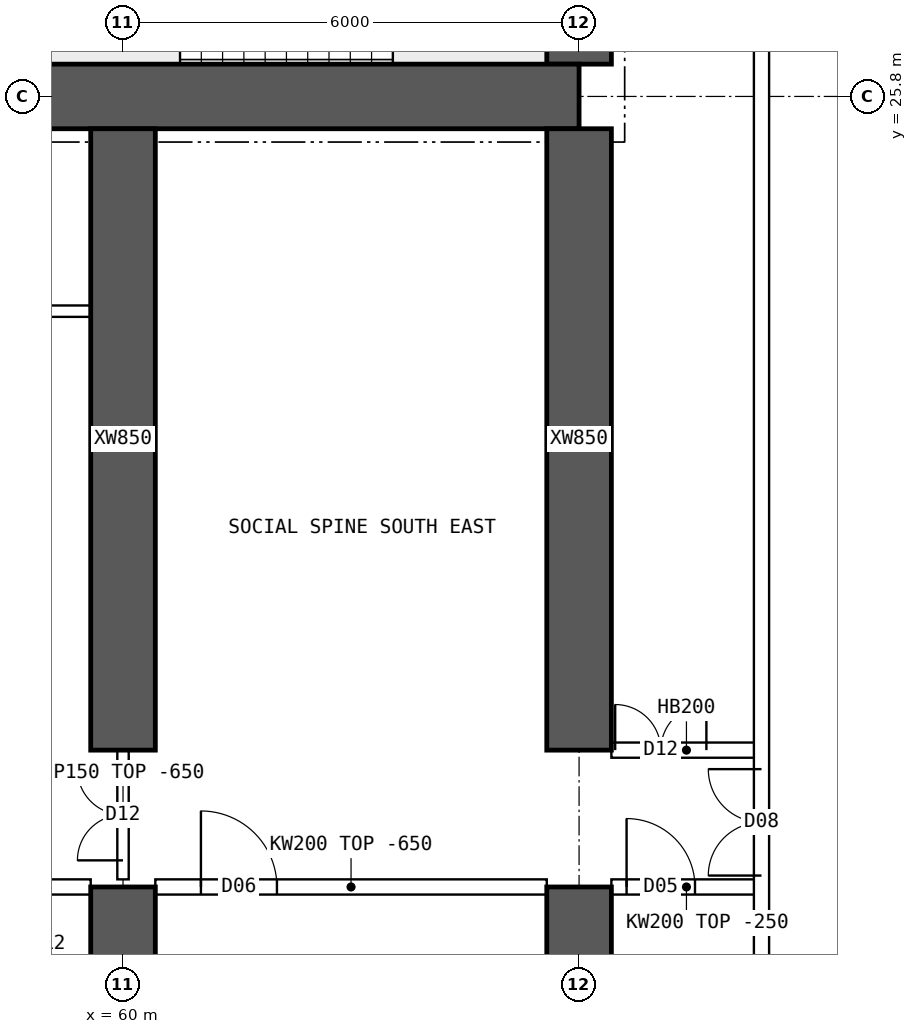
"""IFC4 building model, lengths in metres.
Left out: names, types, materials, properties, quantities, classifications, styles, units other than length and angle.
Written with IfcOpenShell. Run it as: python <this file> out.ifc"""

import sys

from ifc_helpers import new_model, si_unit, direction, frame, frame_2d, origin, place, context, subcontext, project, spatial, polyline, rectangle, outline, extrude, element, fill, save


model = new_model("IFC4")
c1 = context("Model", 3, precision=1e-05, world=origin(), true_north=direction((0.0, 1.0)))
c2 = subcontext(c1, "Body", "Model", "MODEL_VIEW")
j1 = project(units=[si_unit("LENGTHUNIT", "METRE"), si_unit("PLANEANGLEUNIT", "RADIAN")], contexts=[c1])
p1 = place(None, origin())
s1 = spatial("IfcSite", under=j1, at=p1, CompositionType="ELEMENT")
p2 = place(p1, origin())
s2 = spatial("IfcBuilding", under=s1, at=p2, CompositionType="ELEMENT")
p3 = place(p2, frame((0.0, 0.0, 152.35)))
s3 = spatial("IfcBuildingStorey", under=s2, at=p3, CompositionType="ELEMENT", Elevation=152.35)
p4 = place(p3, frame((18.0, 25.8, 0.0), z_axis=(0.0, 0.0, 1.0), x_axis=(1.0, 0.0, 0.0)))
e1 = element("IfcWall", 1, at=p4, inside=s3, PredefinedType="SHEAR", context=c2, shape_type="SweptSolid", body=[
    extrude(rectangle(XDim=48.0, YDim=0.85, at=frame_2d((24.0, 0.0))), origin(), (0.0, 0.0, 1.0), 3.75),
])
p5 = place(p3, frame((66.0, 26.225, 0.0), z_axis=(0.0, 0.0, 1.0), x_axis=(0.0, 1.0, 0.0)))
e2 = element("IfcWall", 2, at=p5, inside=s3, PredefinedType="SHEAR", context=c2, shape_type="SweptSolid", body=[
    extrude(rectangle(XDim=11.55, YDim=0.85, at=frame_2d((5.775, 0.0))), origin(), (0.0, 0.0, 1.0), 3.75),
])
p6 = place(p5, frame((5.075, 0.0, 0.0)))
e3 = element("IfcOpeningElement", 3, at=p6, cuts=e2, PredefinedType="OPENING", context=c2, shape_type="SweptSolid", body=[
    extrude(rectangle(XDim=1.2, YDim=2.1, at=frame_2d((0.6, 1.05))), frame((0.0, 0.435, 0.0), z_axis=(0.0, -1.0, 0.0), x_axis=(1.0, 0.0, 0.0)), (0.0, 0.0, 1.0), 0.87),
])
p7 = place(p3, frame((60.0, 10.0, 0.0), z_axis=(0.0, 0.0, 1.0), x_axis=(0.0, 1.0, 0.0)))
e4 = element("IfcWall", 4, at=p7, inside=s3, PredefinedType="SHEAR", context=c2, shape_type="SweptSolid", body=[
    extrude(rectangle(XDim=5.4, YDim=0.85, at=frame_2d((2.7, 0.0))), origin(), (0.0, 0.0, 1.0), 3.75),
])
p8 = place(p3, frame((60.0, 17.2, 0.0), z_axis=(0.0, 0.0, 1.0), x_axis=(0.0, 1.0, 0.0)))
e5 = element("IfcWall", 5, at=p8, inside=s3, PredefinedType="SHEAR", context=c2, shape_type="SweptSolid", body=[
    extrude(rectangle(XDim=8.175, YDim=0.85, at=frame_2d((4.087, 0.0))), origin(), (0.0, 0.0, 1.0), 3.75),
])
p9 = place(p3, frame((66.0, 10.0, 0.0), z_axis=(0.0, 0.0, 1.0), x_axis=(0.0, 1.0, 0.0)))
e6 = element("IfcWall", 6, at=p9, inside=s3, PredefinedType="SHEAR", context=c2, shape_type="SweptSolid", body=[
    extrude(rectangle(XDim=5.4, YDim=0.85, at=frame_2d((2.7, 0.0))), origin(), (0.0, 0.0, 1.0), 3.75),
])
p10 = place(p3, frame((66.0, 17.2, 0.0), z_axis=(0.0, 0.0, 1.0), x_axis=(0.0, 1.0, 0.0)))
e7 = element("IfcWall", 7, at=p10, inside=s3, PredefinedType="SHEAR", context=c2, shape_type="SweptSolid", body=[
    extrude(rectangle(XDim=8.175, YDim=0.85, at=frame_2d((4.087, 0.0))), origin(), (0.0, 0.0, 1.0), 3.75),
])
p11 = place(p3, frame((54.425, 15.4, 0.0), z_axis=(0.0, 0.0, 1.0), x_axis=(1.0, 0.0, 0.0)))
e8 = element("IfcWall", 8, at=p11, inside=s3, PredefinedType="SOLIDWALL", context=c2, shape_type="SweptSolid", body=[
    extrude(outline(polyline([(0.0, 0.0), (5.15, 0.0), (5.15, 3.1), (0.0, 3.1), (0.0, 0.0)])), frame((0.0, 0.1, 0.0), z_axis=(0.0, -1.0, 0.0), x_axis=(1.0, 0.0, 0.0)), (0.0, 0.0, 1.0), 0.2),
])
p12 = place(p11, frame((0.1, 0.0, 0.0)))
e9 = element("IfcOpeningElement", 9, at=p12, cuts=e8, PredefinedType="OPENING", context=c2, shape_type="SweptSolid", body=[
    extrude(rectangle(XDim=0.9, YDim=2.1, at=frame_2d((0.45, 1.05))), frame((0.0, 0.11, 0.0), z_axis=(0.0, -1.0, 0.0), x_axis=(1.0, 0.0, 0.0)), (0.0, 0.0, 1.0), 0.22),
])
p13 = place(p3, frame((60.425, 15.4, 0.0), z_axis=(0.0, 0.0, 1.0), x_axis=(1.0, 0.0, 0.0)))
e10 = element("IfcWall", 10, at=p13, inside=s3, PredefinedType="SOLIDWALL", context=c2, shape_type="SweptSolid", body=[
    extrude(outline(polyline([(0.0, 0.0), (5.15, 0.0), (5.15, 3.1), (0.0, 3.1), (0.0, 0.0)])), frame((0.0, 0.1, 0.0), z_axis=(0.0, -1.0, 0.0), x_axis=(1.0, 0.0, 0.0)), (0.0, 0.0, 1.0), 0.2),
])
p14 = place(p13, frame((0.6, 0.0, 0.0)))
e11 = element("IfcOpeningElement", 11, at=p14, cuts=e10, PredefinedType="OPENING", context=c2, shape_type="SweptSolid", body=[
    extrude(rectangle(XDim=1.0, YDim=2.1, at=frame_2d((0.5, 1.05))), frame((0.0, 0.11, 0.0), z_axis=(0.0, -1.0, 0.0), x_axis=(1.0, 0.0, 0.0)), (0.0, 0.0, 1.0), 0.22),
])
p15 = place(p3, frame((66.425, 15.4, 0.0), z_axis=(0.0, 0.0, 1.0), x_axis=(1.0, 0.0, 0.0)))
e12 = element("IfcWall", 12, at=p15, inside=s3, PredefinedType="SOLIDWALL", context=c2, shape_type="SweptSolid", body=[
    extrude(rectangle(XDim=1.975, YDim=0.2, at=frame_2d((0.987, 0.0))), origin(), (0.0, 0.0, 1.0), 3.5),
])
p16 = place(p15, frame((0.2, 0.0, 0.0)))
e13 = element("IfcOpeningElement", 13, at=p16, cuts=e12, PredefinedType="OPENING", context=c2, shape_type="SweptSolid", body=[
    extrude(rectangle(XDim=0.9, YDim=2.1, at=frame_2d((0.45, 1.05))), frame((0.0, 0.11, 0.0), z_axis=(0.0, -1.0, 0.0), x_axis=(1.0, 0.0, 0.0)), (0.0, 0.0, 1.0), 0.22),
])
p17 = place(p3, frame((66.425, 17.2, 0.0), z_axis=(0.0, 0.0, 1.0), x_axis=(1.0, 0.0, 0.0)))
e14 = element("IfcWall", 14, at=p17, inside=s3, PredefinedType="SOLIDWALL", context=c2, shape_type="SweptSolid", body=[
    extrude(rectangle(XDim=1.975, YDim=0.2, at=frame_2d((0.987, 0.0))), origin(), (0.0, 0.0, 1.0), 3.5),
])
p18 = place(p17, frame((0.05, 0.0, 0.0)))
e15 = element("IfcOpeningElement", 15, at=p18, cuts=e14, PredefinedType="OPENING", context=c2, shape_type="SweptSolid", body=[
    extrude(rectangle(XDim=1.2, YDim=2.1, at=frame_2d((0.6, 1.05))), frame((0.0, 0.11, 0.0), z_axis=(0.0, -1.0, 0.0), x_axis=(1.0, 0.0, 0.0)), (0.0, 0.0, 1.0), 0.22),
])
p19 = place(p3, frame((54.425, 22.975, 0.0), z_axis=(0.0, 0.0, 1.0), x_axis=(1.0, 0.0, 0.0)))
e16 = element("IfcWall", 16, at=p19, inside=s3, PredefinedType="PARTITIONING", context=c2, shape_type="SweptSolid", body=[
    extrude(rectangle(XDim=5.5, YDim=0.15, at=frame_2d((2.75, 0.0))), origin(), (0.0, 0.0, 1.0), 3.5),
])
p20 = place(p19, frame((0.4, 0.0, 0.0)))
e17 = element("IfcOpeningElement", 17, at=p20, cuts=e16, PredefinedType="OPENING", context=c2, shape_type="SweptSolid", body=[
    extrude(rectangle(XDim=1.0, YDim=2.1, at=frame_2d((0.5, 1.05))), frame((0.0, 0.085, 0.0), z_axis=(0.0, -1.0, 0.0), x_axis=(1.0, 0.0, 0.0)), (0.0, 0.0, 1.0), 0.17),
])
p21 = place(p3, frame((60.0, 15.5, 0.0), z_axis=(0.0, 0.0, 1.0), x_axis=(0.0, 1.0, 0.0)))
e18 = element("IfcWall", 18, at=p21, inside=s3, PredefinedType="PARTITIONING", context=c2, shape_type="SweptSolid", body=[
    extrude(outline(polyline([(0.0, 0.0), (1.7, 0.0), (1.7, 3.1), (0.0, 3.1), (0.0, 0.0)])), frame((0.0, 0.075, 0.0), z_axis=(0.0, -1.0, 0.0), x_axis=(1.0, 0.0, 0.0)), (0.0, 0.0, 1.0), 0.15),
])
p22 = place(p21, frame((0.25, 0.0, 0.0)))
e19 = element("IfcOpeningElement", 19, at=p22, cuts=e18, PredefinedType="OPENING", context=c2, shape_type="SweptSolid", body=[
    extrude(rectangle(XDim=1.2, YDim=2.1, at=frame_2d((0.6, 1.05))), frame((0.0, 0.085, 0.0), z_axis=(0.0, -1.0, 0.0), x_axis=(1.0, 0.0, 0.0)), (0.0, 0.0, 1.0), 0.17),
])
p23 = place(p3, frame((68.4, 10.446, 0.0), z_axis=(0.0, 0.0, 1.0), x_axis=(0.0, 1.0, 0.0)))
e20 = element("IfcWall", 20, at=p23, inside=s3, PredefinedType="SOLIDWALL", context=c2, shape_type="SweptSolid", body=[
    extrude(rectangle(XDim=43.107, YDim=0.2, at=frame_2d((21.554, 0.0))), origin(), (0.0, 0.0, 1.0), 3.5),
])
p24 = place(p23, frame((27.994, 0.0, 0.0)))
e21 = element("IfcOpeningElement", 21, at=p24, cuts=e20, PredefinedType="OPENING", context=c2, shape_type="SweptSolid", body=[
    extrude(rectangle(XDim=1.2, YDim=2.1, at=frame_2d((0.6, 1.05))), frame((0.0, 0.11, 0.0), z_axis=(0.0, -1.0, 0.0), x_axis=(1.0, 0.0, 0.0)), (0.0, 0.0, 1.0), 0.22),
])
p25 = place(p23, frame((5.104, 0.0, 0.0)))
e22 = element("IfcOpeningElement", 22, at=p25, cuts=e20, PredefinedType="OPENING", context=c2, shape_type="SweptSolid", body=[
    extrude(rectangle(XDim=1.4, YDim=2.1, at=frame_2d((0.7, 1.05))), frame((0.0, 0.11, 0.0), z_axis=(0.0, -1.0, 0.0), x_axis=(1.0, 0.0, 0.0)), (0.0, 0.0, 1.0), 0.22),
])
p26 = place(p23, frame((36.504, 0.0, 0.0)))
e23 = element("IfcOpeningElement", 23, at=p26, cuts=e20, PredefinedType="OPENING", context=c2, shape_type="SweptSolid", body=[
    extrude(rectangle(XDim=1.4, YDim=2.1, at=frame_2d((0.7, 1.05))), frame((0.0, 0.11, 0.0), z_axis=(0.0, -1.0, 0.0), x_axis=(1.0, 0.0, 0.0)), (0.0, 0.0, 1.0), 0.22),
])
p27 = place(p18, origin())
e24 = element("IfcDoor", 24, at=p27, inside=s3, OperationType="DOUBLE_DOOR_SINGLE_SWING", PredefinedType="DOOR", context=c2, shape_type="SweptSolid", body=[
    extrude(rectangle(XDim=1.2, YDim=2.1, at=frame_2d((0.6, 1.05))), frame((0.0, 0.025, 0.0), z_axis=(0.0, -1.0, 0.0), x_axis=(1.0, 0.0, 0.0)), (0.0, 0.0, 1.0), 0.05),
])
fill(e15, e24)
p28 = place(p14, origin())
e25 = element("IfcDoor", 25, at=p28, inside=s3, OperationType="SINGLE_SWING_LEFT", PredefinedType="DOOR", context=c2, shape_type="SweptSolid", body=[
    extrude(rectangle(XDim=1.0, YDim=2.1, at=frame_2d((0.5, 1.05))), frame((0.0, 0.025, 0.0), z_axis=(0.0, -1.0, 0.0), x_axis=(1.0, 0.0, 0.0)), (0.0, 0.0, 1.0), 0.05),
])
fill(e11, e25)
p29 = place(p22, origin())
e26 = element("IfcDoor", 26, at=p29, inside=s3, OperationType="DOUBLE_DOOR_SINGLE_SWING", PredefinedType="DOOR", context=c2, shape_type="SweptSolid", body=[
    extrude(rectangle(XDim=1.2, YDim=2.1, at=frame_2d((0.6, 1.05))), frame((0.0, 0.025, 0.0), z_axis=(0.0, -1.0, 0.0), x_axis=(1.0, 0.0, 0.0)), (0.0, 0.0, 1.0), 0.05),
])
fill(e19, e26)
p30 = place(p25, origin())
e27 = element("IfcDoor", 27, at=p30, inside=s3, OperationType="DOUBLE_DOOR_SINGLE_SWING", PredefinedType="DOOR", context=c2, shape_type="SweptSolid", body=[
    extrude(rectangle(XDim=1.4, YDim=2.1, at=frame_2d((0.7, 1.05))), frame((0.0, 0.025, 0.0), z_axis=(0.0, -1.0, 0.0), x_axis=(1.0, 0.0, 0.0)), (0.0, 0.0, 1.0), 0.05),
])
fill(e22, e27)
p31 = place(p16, origin())
e28 = element("IfcDoor", 28, at=p31, inside=s3, OperationType="SINGLE_SWING_LEFT", PredefinedType="DOOR", context=c2, shape_type="SweptSolid", body=[
    extrude(rectangle(XDim=0.9, YDim=2.1, at=frame_2d((0.45, 1.05))), frame((0.0, 0.025, 0.0), z_axis=(0.0, -1.0, 0.0), x_axis=(1.0, 0.0, 0.0)), (0.0, 0.0, 1.0), 0.05),
])
fill(e13, e28)
save(model, sys.argv[1])
